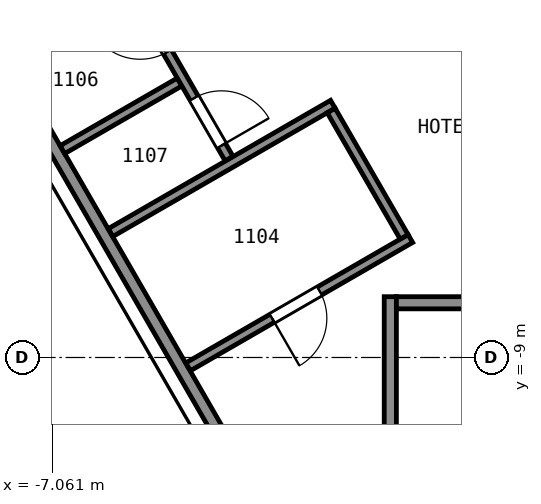
"""IFC4 building model, lengths in metres.
Left out: names, types, materials, properties, quantities, classifications, styles, units other than length and angle.
Written with IfcOpenShell. Run it as: python <this file> out.ifc"""

import sys

from ifc_helpers import new_model, si_unit, direction, frame, frame_2d, origin, place, context, subcontext, project, spatial, rectangle, extrude, element, fill, save


model = new_model("IFC4")
c1 = context("Model", 3, precision=1e-05, world=origin(), true_north=direction((0.0, 1.0)))
c2 = subcontext(c1, "Body", "Model", "MODEL_VIEW")
j1 = project(units=[si_unit("LENGTHUNIT", "METRE"), si_unit("PLANEANGLEUNIT", "RADIAN")], contexts=[c1])
p1 = place(None, origin())
s1 = spatial("IfcSite", under=j1, at=p1, CompositionType="ELEMENT")
p2 = place(p1, origin())
s2 = spatial("IfcBuilding", under=s1, at=p2, CompositionType="ELEMENT")
p3 = place(p2, frame((0.0, 0.0, 54.8)))
s3 = spatial("IfcBuildingStorey", under=s2, at=p3, CompositionType="ELEMENT", Elevation=54.8)
p4 = place(p3, frame((-1.5, -8.0, 0.0), z_axis=(0.0, 0.0, 1.0), x_axis=(0.0, -1.0, 0.0)))
e1 = element("IfcWall", 1, at=p4, inside=s3, PredefinedType="PARTITIONING", context=c2, shape_type="SweptSolid", body=[
    extrude(rectangle(XDim=12.0, YDim=0.2, at=frame_2d((6.0, 0.0))), origin(), (0.0, 0.0, 1.0), 3.35),
])
p5 = place(p3, frame((-1.4, -8.1, 0.0), z_axis=(0.0, 0.0, 1.0), x_axis=(1.0, 0.0, 0.0)))
e2 = element("IfcWall", 2, at=p5, inside=s3, PredefinedType="PARTITIONING", context=c2, shape_type="SweptSolid", body=[
    extrude(rectangle(XDim=2.8, YDim=0.2, at=frame_2d((1.4, 0.0))), origin(), (0.0, 0.0, 1.0), 3.35),
])
p6 = place(p3, frame((-13.664, 5.946, 0.0), z_axis=(0.0, 0.0, 1.0), x_axis=(0.499994327219, -0.866028678941, 0.0)))
e3 = element("IfcWall", 3, at=p6, inside=s3, PredefinedType="PARTITIONING", context=c2, shape_type="SweptSolid", body=[
    extrude(rectangle(XDim=23.968, YDim=0.2, at=frame_2d((11.984, 0.0))), origin(), (0.0, 0.0, 1.0), 3.35),
])
p7 = place(p3, frame((-7.856, -3.912, 0.0), z_axis=(0.0, 0.0, 1.0), x_axis=(0.865971748, 0.500092923031, 0.0)))
e4 = element("IfcWall", 4, at=p7, inside=s3, PredefinedType="PARTITIONING", context=c2, shape_type="SweptSolid", body=[
    extrude(rectangle(XDim=2.225, YDim=0.15, at=frame_2d((1.112, 0.0))), origin(), (0.0, 0.0, 1.0), 3.35),
])
p8 = place(p3, frame((-6.892, -5.582, 0.0), z_axis=(0.0, 0.0, 1.0), x_axis=(0.865944298464, 0.500140452231, 0.0)))
e5 = element("IfcWall", 5, at=p8, inside=s3, PredefinedType="PARTITIONING", context=c2, shape_type="SweptSolid", body=[
    extrude(rectangle(XDim=2.224, YDim=0.15, at=frame_2d((1.112, 0.0))), origin(), (0.0, 0.0, 1.0), 3.35),
])
p9 = place(p3, frame((-6.1, -6.946, 0.0), z_axis=(0.0, 0.0, 1.0), x_axis=(0.866038200431, 0.499977834903, 0.0)))
e6 = element("IfcWall", 6, at=p9, inside=s3, PredefinedType="PARTITIONING", context=c2, shape_type="SweptSolid", body=[
    extrude(rectangle(XDim=4.22, YDim=0.15, at=frame_2d((2.11, 0.0))), origin(), (0.0, 0.0, 1.0), 3.35),
])
p10 = place(p3, frame((-4.152, -5.729, 0.0), z_axis=(0.0, 0.0, 1.0), x_axis=(-0.500024287448, 0.866011380966, 0.0)))
e7 = element("IfcWall", 7, at=p10, inside=s3, PredefinedType="PARTITIONING", context=c2, shape_type="SweptSolid", body=[
    extrude(rectangle(XDim=3.501, YDim=0.15, at=frame_2d((1.75, 0.0))), origin(), (0.0, 0.0, 1.0), 3.35),
])
p11 = place(p10, frame((2.026, 0.0, 0.0)))
e8 = element("IfcOpeningElement", 8, at=p11, cuts=e7, PredefinedType="OPENING", context=c2, shape_type="SweptSolid", body=[
    extrude(rectangle(XDim=0.9, YDim=2.1, at=frame_2d((0.45, 1.05))), frame((0.0, 0.085, 0.0), z_axis=(0.0, -1.0, 0.0), x_axis=(1.0, 0.0, 0.0)), (0.0, 0.0, 1.0), 0.17),
])
p12 = place(p10, frame((0.248, 0.0, 0.0)))
e9 = element("IfcOpeningElement", 9, at=p12, cuts=e7, PredefinedType="OPENING", context=c2, shape_type="SweptSolid", body=[
    extrude(rectangle(XDim=0.9, YDim=2.1, at=frame_2d((0.45, 1.05))), frame((0.0, 0.085, 0.0), z_axis=(0.0, -1.0, 0.0), x_axis=(1.0, 0.0, 0.0)), (0.0, 0.0, 1.0), 0.17),
])
p13 = place(p3, frame((-4.825, -9.154, 0.0), z_axis=(0.0, 0.0, 1.0), x_axis=(0.866023738697, 0.500002884005, 0.0)))
e10 = element("IfcWall", 10, at=p13, inside=s3, PredefinedType="PARTITIONING", context=c2, shape_type="SweptSolid", body=[
    extrude(rectangle(XDim=4.22, YDim=0.15, at=frame_2d((2.11, 0.0))), origin(), (0.0, 0.0, 1.0), 3.35),
])
p14 = place(p13, frame((1.595, 0.0, 0.0)))
e11 = element("IfcOpeningElement", 11, at=p14, cuts=e10, PredefinedType="OPENING", context=c2, shape_type="SweptSolid", body=[
    extrude(rectangle(XDim=0.9, YDim=2.1, at=frame_2d((0.45, 1.05))), frame((0.0, 0.085, 0.0), z_axis=(0.0, -1.0, 0.0), x_axis=(1.0, 0.0, 0.0)), (0.0, 0.0, 1.0), 0.17),
])
p15 = place(p3, frame((-2.472, -4.938, 0.0), z_axis=(0.0, 0.0, 1.0), x_axis=(0.500045362686, -0.865999212041, 0.0)))
e12 = element("IfcWall", 12, at=p15, inside=s3, PredefinedType="PARTITIONING", context=c2, shape_type="SweptSolid", body=[
    extrude(rectangle(XDim=2.4, YDim=0.15, at=frame_2d((1.2, 0.0))), origin(), (0.0, 0.0, 1.0), 3.35),
])
p16 = place(p3, frame((-3.766, -17.959, 0.0), z_axis=(0.0, 0.0, 1.0), x_axis=(-0.500002884005, 0.866023738697, 0.0)))
e13 = element("IfcWall", 13, at=p16, inside=s3, PredefinedType="PARTITIONING", context=c2, shape_type="SweptSolid", body=[
    extrude(rectangle(XDim=28.135, YDim=0.125, at=frame_2d((14.067, 0.0))), origin(), (0.0, 0.0, 1.0), 2.613),
])
p17 = place(p16, frame((25.422, 0.0, 0.0)))
e14 = element("IfcOpeningElement", 14, at=p17, cuts=e13, PredefinedType="OPENING", context=c2, shape_type="SweptSolid", body=[
    extrude(rectangle(XDim=1.0, YDim=2.1, at=frame_2d((0.5, 1.05))), frame((0.0, 0.073, 0.0), z_axis=(0.0, -1.0, 0.0), x_axis=(1.0, 0.0, 0.0)), (0.0, 0.0, 1.0), 0.145),
])
p18 = place(p16, frame((21.693, 0.0, 0.0)))
e15 = element("IfcOpeningElement", 15, at=p18, cuts=e13, PredefinedType="OPENING", context=c2, shape_type="SweptSolid", body=[
    extrude(rectangle(XDim=0.9, YDim=2.1, at=frame_2d((0.45, 1.05))), frame((0.0, 0.073, 0.0), z_axis=(0.0, -1.0, 0.0), x_axis=(1.0, 0.0, 0.0)), (0.0, 0.0, 1.0), 0.145),
])
p19 = place(p16, frame((14.438, 0.0, 0.0)))
e16 = element("IfcOpeningElement", 16, at=p19, cuts=e13, PredefinedType="OPENING", context=c2, shape_type="SweptSolid", body=[
    extrude(rectangle(XDim=0.9, YDim=2.1, at=frame_2d((0.45, 1.05))), frame((0.0, 0.073, 0.0), z_axis=(0.0, -1.0, 0.0), x_axis=(1.0, 0.0, 0.0)), (0.0, 0.0, 1.0), 0.145),
])
p20 = place(p16, frame((11.712, 0.0, 0.0)))
e17 = element("IfcOpeningElement", 17, at=p20, cuts=e13, PredefinedType="OPENING", context=c2, shape_type="SweptSolid", body=[
    extrude(rectangle(XDim=0.9, YDim=2.1, at=frame_2d((0.45, 1.05))), frame((0.0, 0.073, 0.0), z_axis=(0.0, -1.0, 0.0), x_axis=(1.0, 0.0, 0.0)), (0.0, 0.0, 1.0), 0.145),
])
p21 = place(p16, frame((4.787, 0.0, 0.0)))
e18 = element("IfcOpeningElement", 18, at=p21, cuts=e13, PredefinedType="OPENING", context=c2, shape_type="SweptSolid", body=[
    extrude(rectangle(XDim=0.9, YDim=2.1, at=frame_2d((0.45, 1.05))), frame((0.0, 0.073, 0.0), z_axis=(0.0, -1.0, 0.0), x_axis=(1.0, 0.0, 0.0)), (0.0, 0.0, 1.0), 0.145),
])
p22 = place(p16, frame((1.762, 0.0, 0.0)))
e19 = element("IfcOpeningElement", 19, at=p22, cuts=e13, PredefinedType="OPENING", context=c2, shape_type="SweptSolid", body=[
    extrude(rectangle(XDim=0.9, YDim=2.1, at=frame_2d((0.45, 1.05))), frame((0.0, 0.073, 0.0), z_axis=(0.0, -1.0, 0.0), x_axis=(1.0, 0.0, 0.0)), (0.0, 0.0, 1.0), 0.145),
])
p23 = place(p11, origin())
e20 = element("IfcDoor", 20, at=p23, inside=s3, OperationType="SINGLE_SWING_RIGHT", PredefinedType="DOOR", context=c2, shape_type="SweptSolid", body=[
    extrude(rectangle(XDim=0.9, YDim=2.1, at=frame_2d((0.45, 1.05))), frame((0.0, 0.025, 0.0), z_axis=(0.0, -1.0, 0.0), x_axis=(1.0, 0.0, 0.0)), (0.0, 0.0, 1.0), 0.05),
])
fill(e8, e20)
p24 = place(p12, origin())
e21 = element("IfcDoor", 21, at=p24, inside=s3, OperationType="SINGLE_SWING_LEFT", PredefinedType="DOOR", context=c2, shape_type="SweptSolid", body=[
    extrude(rectangle(XDim=0.9, YDim=2.1, at=frame_2d((0.45, 1.05))), frame((0.0, 0.025, 0.0), z_axis=(0.0, -1.0, 0.0), x_axis=(1.0, 0.0, 0.0)), (0.0, 0.0, 1.0), 0.05),
])
fill(e9, e21)
p25 = place(p14, origin())
e22 = element("IfcDoor", 22, at=p25, inside=s3, OperationType="SINGLE_SWING_LEFT", PredefinedType="DOOR", context=c2, shape_type="SweptSolid", body=[
    extrude(rectangle(XDim=0.9, YDim=2.1, at=frame_2d((0.45, 1.05))), frame((0.0, 0.025, 0.0), z_axis=(0.0, -1.0, 0.0), x_axis=(1.0, 0.0, 0.0)), (0.0, 0.0, 1.0), 0.05),
])
fill(e11, e22)
save(model, sys.argv[1])
